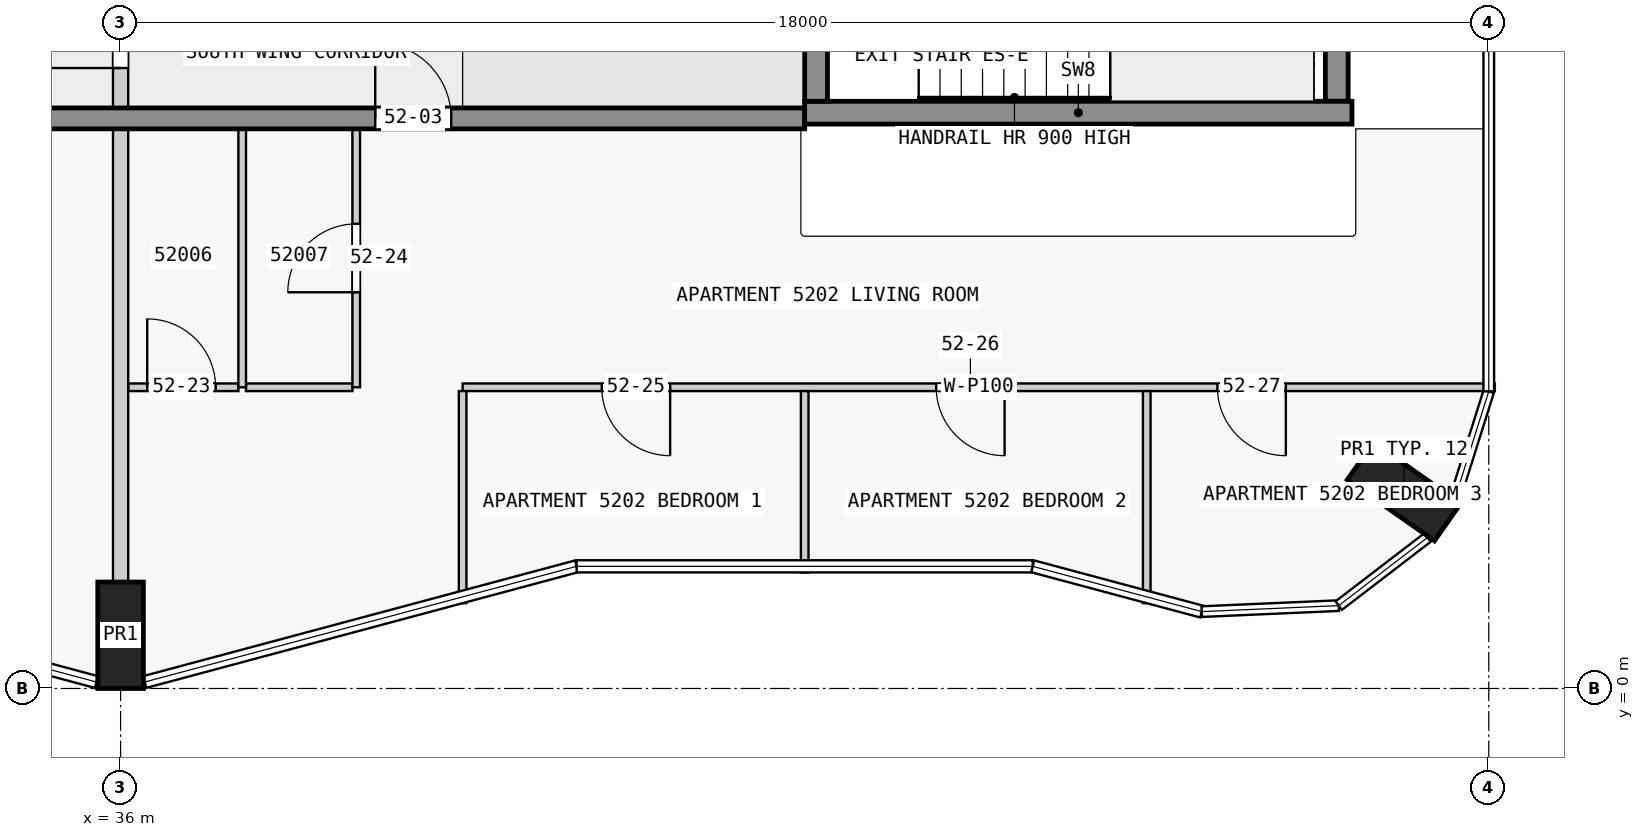
"""IFC4 building model, lengths in metres.
Left out: names, types, materials, properties, quantities, classifications, styles, units other than length and angle.
Written with IfcOpenShell. Run it as: python <this file> out.ifc"""

import sys

from ifc_helpers import new_model, si_unit, direction, frame, frame_2d, origin, origin_2d, place, context, subcontext, project, spatial, rectangle, extrude, element, fill, save


model = new_model("IFC4")
c1 = context("Model", 3, precision=1e-05, world=origin(), true_north=direction((0.0, 1.0)))
c2 = subcontext(c1, "Body", "Model", "MODEL_VIEW")
j1 = project(units=[si_unit("LENGTHUNIT", "METRE"), si_unit("PLANEANGLEUNIT", "RADIAN")], contexts=[c1])
p1 = place(None, origin())
s1 = spatial("IfcSite", under=j1, at=p1, CompositionType="ELEMENT")
p2 = place(p1, origin())
s2 = spatial("IfcBuilding", under=s1, at=p2, CompositionType="ELEMENT")
p3 = place(p2, frame((0.0, 0.0, 201.4)))
s3 = spatial("IfcBuildingStorey", under=s2, at=p3, CompositionType="ELEMENT", Elevation=201.4)
for number, where, z_axis, x_axis in (
    (1, (36.0, 0.7, 0.0), (0.0, 0.0, 1.0), (1.0, 0.0, 0.0)),
    (2, (52.884, 2.59, 0.0), (0.0, 0.0, 1.0), (0.574, 0.819, 0.0)),
):
    element("IfcColumn", number, at=place(p3, frame(where, z_axis=z_axis, x_axis=x_axis)), inside=s3, PredefinedType="COLUMN", context=c2, shape_type="SweptSolid", body=[
        extrude(rectangle(XDim=0.6, YDim=1.4, at=origin_2d()), origin(), (0.0, 0.0, 1.0), 3.5),
    ])
p4 = place(p3, frame((45.15, 7.725, 0.0), z_axis=(0.0, 0.0, 1.0), x_axis=(0.0, 1.0, 0.0)))
e3 = element("IfcWall", 3, at=p4, inside=s3, PredefinedType="SHEAR", context=c2, shape_type="SweptSolid", body=[
    extrude(rectangle(XDim=2.55, YDim=0.3, at=frame_2d((1.275, 0.0))), origin(), (0.0, 0.0, 1.0), 3.5),
])
p5 = place(p4, frame((0.725, 0.0, 0.0)))
e4 = element("IfcOpeningElement", 4, at=p5, cuts=e3, PredefinedType="OPENING", context=c2, shape_type="SweptSolid", body=[
    extrude(rectangle(XDim=1.1, YDim=2.1, at=frame_2d((0.55, 1.05))), frame((0.0, 0.16, 0.0), z_axis=(0.0, -1.0, 0.0), x_axis=(1.0, 0.0, 0.0)), (0.0, 0.0, 1.0), 0.32),
])
p6 = place(p3, frame((52.0, 7.725, 0.0), z_axis=(0.0, 0.0, 1.0), x_axis=(0.0, 1.0, 0.0)))
e5 = element("IfcWall", 5, at=p6, inside=s3, PredefinedType="SHEAR", context=c2, shape_type="SweptSolid", body=[
    extrude(rectangle(XDim=2.55, YDim=0.3, at=frame_2d((1.275, 0.0))), origin(), (0.0, 0.0, 1.0), 3.5),
])
p7 = place(p3, frame((45.0, 7.575, 0.0), z_axis=(0.0, 0.0, 1.0), x_axis=(1.0, 0.0, 0.0)))
e6 = element("IfcWall", 6, at=p7, inside=s3, PredefinedType="SHEAR", context=c2, shape_type="SweptSolid", body=[
    extrude(rectangle(XDim=7.2, YDim=0.3, at=frame_2d((3.6, 0.0))), origin(), (0.0, 0.0, 1.0), 3.5),
])
p8 = place(p3, frame((22.5, 7.5, 0.0), z_axis=(0.0, 0.0, 1.0), x_axis=(1.0, 0.0, 0.0)))
e7 = element("IfcWall", 7, at=p8, inside=s3, PredefinedType="SHEAR", context=c2, shape_type="SweptSolid", body=[
    extrude(rectangle(XDim=22.5, YDim=0.275, at=frame_2d((11.25, 0.0))), origin(), (0.0, 0.0, 1.0), 3.25),
])
p9 = place(p8, frame((4.05, 0.0, 0.0)))
e8 = element("IfcOpeningElement", 8, at=p9, cuts=e7, PredefinedType="OPENING", context=c2, shape_type="SweptSolid", body=[
    extrude(rectangle(XDim=1.0, YDim=2.1, at=frame_2d((0.5, 1.05))), frame((0.0, 0.147, 0.0), z_axis=(0.0, -1.0, 0.0), x_axis=(1.0, 0.0, 0.0)), (0.0, 0.0, 1.0), 0.295),
])
p10 = place(p8, frame((10.35, 0.0, 0.0)))
e9 = element("IfcOpeningElement", 9, at=p10, cuts=e7, PredefinedType="OPENING", context=c2, shape_type="SweptSolid", body=[
    extrude(rectangle(XDim=1.8, YDim=2.1, at=frame_2d((0.9, 1.05))), frame((0.0, 0.147, 0.0), z_axis=(0.0, -1.0, 0.0), x_axis=(1.0, 0.0, 0.0)), (0.0, 0.0, 1.0), 0.295),
])
p11 = place(p8, frame((16.85, 0.0, 0.0)))
e10 = element("IfcOpeningElement", 10, at=p11, cuts=e7, PredefinedType="OPENING", context=c2, shape_type="SweptSolid", body=[
    extrude(rectangle(XDim=1.0, YDim=2.1, at=frame_2d((0.5, 1.05))), frame((0.0, 0.147, 0.0), z_axis=(0.0, -1.0, 0.0), x_axis=(1.0, 0.0, 0.0)), (0.0, 0.0, 1.0), 0.295),
])
p12 = place(p3, frame((54.08, 3.962, 0.0), z_axis=(0.0, 0.0, 1.0), x_axis=(-1.0, 0.0, 0.0)))
e11 = element("IfcWall", 11, at=p12, inside=s3, PredefinedType="PARTITIONING", context=c2, shape_type="SweptSolid", body=[
    extrude(rectangle(XDim=13.58, YDim=0.1, at=frame_2d((6.79, 0.0))), origin(), (0.0, 0.0, 1.0), 3.25),
])
p13 = place(p12, frame((10.85, 0.0, 0.0)))
e12 = element("IfcOpeningElement", 12, at=p13, cuts=e11, PredefinedType="OPENING", context=c2, shape_type="SweptSolid", body=[
    extrude(rectangle(XDim=0.9, YDim=2.1, at=frame_2d((0.45, 1.05))), frame((0.0, 0.06, 0.0), z_axis=(0.0, -1.0, 0.0), x_axis=(1.0, 0.0, 0.0)), (0.0, 0.0, 1.0), 0.12),
])
p14 = place(p12, frame((6.45, 0.0, 0.0)))
e13 = element("IfcOpeningElement", 13, at=p14, cuts=e11, PredefinedType="OPENING", context=c2, shape_type="SweptSolid", body=[
    extrude(rectangle(XDim=0.9, YDim=2.1, at=frame_2d((0.45, 1.05))), frame((0.0, 0.06, 0.0), z_axis=(0.0, -1.0, 0.0), x_axis=(1.0, 0.0, 0.0)), (0.0, 0.0, 1.0), 0.12),
])
p15 = place(p12, frame((2.75, 0.0, 0.0)))
e14 = element("IfcOpeningElement", 14, at=p15, cuts=e11, PredefinedType="OPENING", context=c2, shape_type="SweptSolid", body=[
    extrude(rectangle(XDim=0.9, YDim=2.1, at=frame_2d((0.45, 1.05))), frame((0.0, 0.06, 0.0), z_axis=(0.0, -1.0, 0.0), x_axis=(1.0, 0.0, 0.0)), (0.0, 0.0, 1.0), 0.12),
])
p16 = place(p3, frame((36.1, 3.962, 0.0), z_axis=(0.0, 0.0, 1.0), x_axis=(1.0, 0.0, 0.0)))
e15 = element("IfcWall", 15, at=p16, inside=s3, PredefinedType="PARTITIONING", context=c2, shape_type="SweptSolid", body=[
    extrude(rectangle(XDim=1.45, YDim=0.1, at=frame_2d((0.725, 0.0))), origin(), (0.0, 0.0, 1.0), 3.25),
])
p17 = place(p16, frame((0.25, 0.0, 0.0)))
e16 = element("IfcOpeningElement", 16, at=p17, cuts=e15, PredefinedType="OPENING", context=c2, shape_type="SweptSolid", body=[
    extrude(rectangle(XDim=0.9, YDim=2.1, at=frame_2d((0.45, 1.05))), frame((0.0, 0.06, 0.0), z_axis=(0.0, -1.0, 0.0), x_axis=(1.0, 0.0, 0.0)), (0.0, 0.0, 1.0), 0.12),
])
p18 = place(p3, frame((37.65, 3.962, 0.0), z_axis=(0.0, 0.0, 1.0), x_axis=(1.0, 0.0, 0.0)))
e17 = element("IfcWall", 17, at=p18, inside=s3, PredefinedType="PARTITIONING", context=c2, shape_type="SweptSolid", body=[
    extrude(rectangle(XDim=1.4, YDim=0.1, at=frame_2d((0.7, 0.0))), origin(), (0.0, 0.0, 1.0), 3.25),
])
p19 = place(p3, frame((36.0, 1.4, 0.0), z_axis=(0.0, 0.0, 1.0), x_axis=(0.0, 1.0, 0.0)))
e18 = element("IfcWall", 18, at=p19, inside=s3, PredefinedType="PARTITIONING", context=c2, shape_type="SweptSolid", body=[
    extrude(rectangle(XDim=5.963, YDim=0.2, at=frame_2d((2.981, 0.0))), origin(), (0.0, 0.0, 1.0), 3.25),
])
p20 = place(p3, frame((37.6, 3.962, 0.0), z_axis=(0.0, 0.0, 1.0), x_axis=(0.0, 1.0, 0.0)))
e19 = element("IfcWall", 19, at=p20, inside=s3, PredefinedType="PARTITIONING", context=c2, shape_type="SweptSolid", body=[
    extrude(rectangle(XDim=3.4, YDim=0.1, at=frame_2d((1.7, 0.0))), origin(), (0.0, 0.0, 1.0), 3.25),
])
p21 = place(p3, frame((39.1, 3.962, 0.0), z_axis=(0.0, 0.0, 1.0), x_axis=(0.0, 1.0, 0.0)))
e20 = element("IfcWall", 20, at=p21, inside=s3, PredefinedType="PARTITIONING", context=c2, shape_type="SweptSolid", body=[
    extrude(rectangle(XDim=3.4, YDim=0.1, at=frame_2d((1.7, 0.0))), origin(), (0.0, 0.0, 1.0), 3.25),
])
p22 = place(p21, frame((1.25, 0.0, 0.0)))
e21 = element("IfcOpeningElement", 21, at=p22, cuts=e20, PredefinedType="OPENING", context=c2, shape_type="SweptSolid", body=[
    extrude(rectangle(XDim=0.9, YDim=2.1, at=frame_2d((0.45, 1.05))), frame((0.0, 0.06, 0.0), z_axis=(0.0, -1.0, 0.0), x_axis=(1.0, 0.0, 0.0)), (0.0, 0.0, 1.0), 0.12),
])
p23 = place(p3, frame((40.5, 3.913, 0.0), z_axis=(0.0, 0.0, 1.0), x_axis=(0.0, -1.0, 0.0)))
e22 = element("IfcWall", 22, at=p23, inside=s3, PredefinedType="PARTITIONING", context=c2, shape_type="SweptSolid", body=[
    extrude(rectangle(XDim=2.79, YDim=0.1, at=frame_2d((1.395, 0.0))), origin(), (0.0, 0.0, 1.0), 3.25),
])
p24 = place(p3, frame((45.0, 1.527, 0.0), z_axis=(0.0, 0.0, 1.0), x_axis=(0.0, 1.0, 0.0)))
e23 = element("IfcWall", 23, at=p24, inside=s3, PredefinedType="PARTITIONING", context=c2, shape_type="SweptSolid", body=[
    extrude(rectangle(XDim=2.386, YDim=0.1, at=frame_2d((1.193, 0.0))), origin(), (0.0, 0.0, 1.0), 3.25),
])
p25 = place(p3, frame((49.5, 1.122, 0.0), z_axis=(0.0, 0.0, 1.0), x_axis=(0.0, 1.0, 0.0)))
e24 = element("IfcWall", 24, at=p25, inside=s3, PredefinedType="PARTITIONING", context=c2, shape_type="SweptSolid", body=[
    extrude(rectangle(XDim=2.79, YDim=0.1, at=frame_2d((1.395, 0.0))), origin(), (0.0, 0.0, 1.0), 3.25),
])
p26 = place(p3, frame((36.0, 7.462, 0.0), z_axis=(0.0, 0.0, 1.0), x_axis=(0.0, 1.0, 0.0)))
e25 = element("IfcWall", 25, at=p26, inside=s3, PredefinedType="PARTITIONING", context=c2, shape_type="SweptSolid", body=[
    extrude(rectangle(XDim=3.175, YDim=0.2, at=frame_2d((1.587, 0.0))), origin(), (0.0, 0.0, 1.0), 3.25),
])
p27 = place(p26, frame((0.7, 0.0, 0.0)))
e26 = element("IfcOpeningElement", 26, at=p27, cuts=e25, PredefinedType="OPENING", context=c2, shape_type="SweptSolid", body=[
    extrude(rectangle(XDim=1.8, YDim=2.1, at=frame_2d((0.9, 1.05))), frame((0.0, 0.11, 0.0), z_axis=(0.0, -1.0, 0.0), x_axis=(1.0, 0.0, 0.0)), (0.0, 0.0, 1.0), 0.22),
])
p28 = place(p11, origin())
e27 = element("IfcDoor", 27, at=p28, inside=s3, OperationType="SINGLE_SWING_RIGHT", PredefinedType="DOOR", context=c2, shape_type="SweptSolid", body=[
    extrude(rectangle(XDim=1.0, YDim=2.1, at=frame_2d((0.5, 1.05))), frame((0.0, 0.025, 0.0), z_axis=(0.0, -1.0, 0.0), x_axis=(1.0, 0.0, 0.0)), (0.0, 0.0, 1.0), 0.05),
])
fill(e10, e27)
p29 = place(p27, origin())
e28 = element("IfcDoor", 28, at=p29, inside=s3, OperationType="SINGLE_SWING_RIGHT", PredefinedType="DOOR", context=c2, shape_type="SweptSolid", body=[
    extrude(rectangle(XDim=1.8, YDim=2.1, at=frame_2d((0.9, 1.05))), frame((0.0, 0.025, 0.0), z_axis=(0.0, -1.0, 0.0), x_axis=(1.0, 0.0, 0.0)), (0.0, 0.0, 1.0), 0.05),
])
fill(e26, e28)
p30 = place(p17, origin())
e29 = element("IfcDoor", 29, at=p30, inside=s3, OperationType="SINGLE_SWING_LEFT", PredefinedType="DOOR", context=c2, shape_type="SweptSolid", body=[
    extrude(rectangle(XDim=0.9, YDim=2.1, at=frame_2d((0.45, 1.05))), frame((0.0, 0.025, 0.0), z_axis=(0.0, -1.0, 0.0), x_axis=(1.0, 0.0, 0.0)), (0.0, 0.0, 1.0), 0.05),
])
fill(e16, e29)
p31 = place(p22, origin())
e30 = element("IfcDoor", 30, at=p31, inside=s3, OperationType="SINGLE_SWING_LEFT", PredefinedType="DOOR", context=c2, shape_type="SweptSolid", body=[
    extrude(rectangle(XDim=0.9, YDim=2.1, at=frame_2d((0.45, 1.05))), frame((0.0, 0.025, 0.0), z_axis=(0.0, -1.0, 0.0), x_axis=(1.0, 0.0, 0.0)), (0.0, 0.0, 1.0), 0.05),
])
fill(e21, e30)
p32 = place(p13, origin())
e31 = element("IfcDoor", 31, at=p32, inside=s3, OperationType="SINGLE_SWING_RIGHT", PredefinedType="DOOR", context=c2, shape_type="SweptSolid", body=[
    extrude(rectangle(XDim=0.9, YDim=2.1, at=frame_2d((0.45, 1.05))), frame((0.0, 0.025, 0.0), z_axis=(0.0, -1.0, 0.0), x_axis=(1.0, 0.0, 0.0)), (0.0, 0.0, 1.0), 0.05),
])
fill(e12, e31)
p33 = place(p14, origin())
e32 = element("IfcDoor", 32, at=p33, inside=s3, OperationType="SINGLE_SWING_RIGHT", PredefinedType="DOOR", context=c2, shape_type="SweptSolid", body=[
    extrude(rectangle(XDim=0.9, YDim=2.1, at=frame_2d((0.45, 1.05))), frame((0.0, 0.025, 0.0), z_axis=(0.0, -1.0, 0.0), x_axis=(1.0, 0.0, 0.0)), (0.0, 0.0, 1.0), 0.05),
])
fill(e13, e32)
p34 = place(p15, origin())
e33 = element("IfcDoor", 33, at=p34, inside=s3, OperationType="SINGLE_SWING_LEFT", PredefinedType="DOOR", context=c2, shape_type="SweptSolid", body=[
    extrude(rectangle(XDim=0.9, YDim=2.1, at=frame_2d((0.45, 1.05))), frame((0.0, 0.025, 0.0), z_axis=(0.0, -1.0, 0.0), x_axis=(1.0, 0.0, 0.0)), (0.0, 0.0, 1.0), 0.05),
])
fill(e14, e33)
save(model, sys.argv[1])
